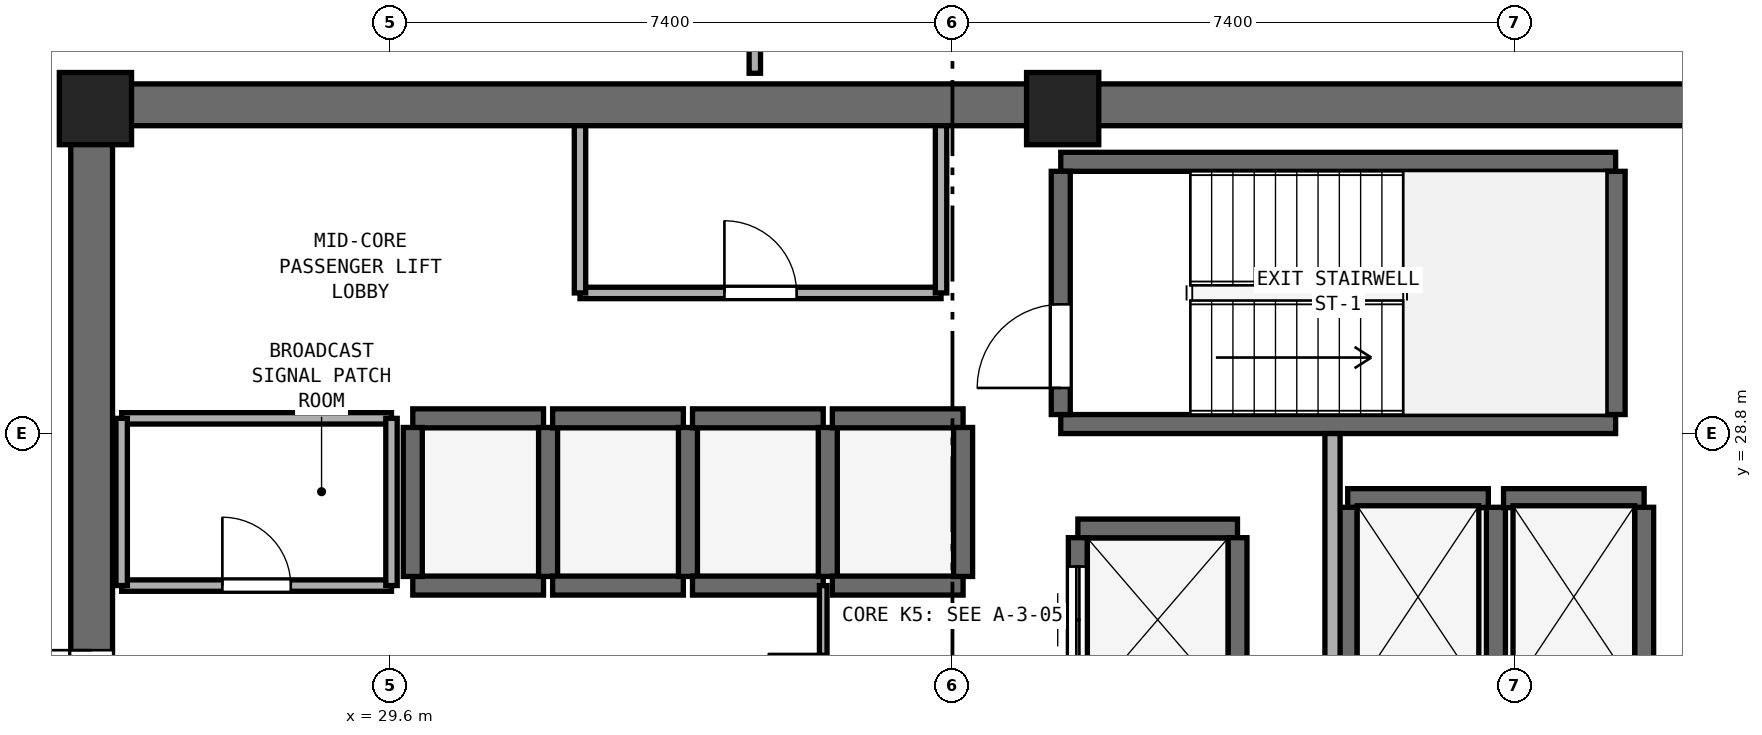
"""IFC4 building model, lengths in metres.
Left out: names, types, materials, properties, quantities, classifications, styles, units other than length and angle.
Written with IfcOpenShell. Run it as: python <this file> out.ifc"""

import sys

from ifc_helpers import new_model, si_unit, direction, frame, frame_2d, origin, origin_2d, place, context, subcontext, project, spatial, rectangle, extrude, element, fill, save


model = new_model("IFC4")
c1 = context("Model", 3, precision=1e-05, world=origin(), true_north=direction((0.0, 1.0)))
c2 = subcontext(c1, "Body", "Model", "MODEL_VIEW")
j1 = project(units=[si_unit("LENGTHUNIT", "METRE"), si_unit("PLANEANGLEUNIT", "RADIAN")], contexts=[c1])
p1 = place(None, origin())
s1 = spatial("IfcSite", under=j1, at=p1, CompositionType="ELEMENT")
p2 = place(p1, origin())
s2 = spatial("IfcBuilding", under=s1, at=p2, CompositionType="ELEMENT")
p3 = place(p2, frame((0.0, 0.0, 216.2)))
s3 = spatial("IfcBuildingStorey", under=s2, at=p3, CompositionType="ELEMENT", Elevation=216.2)
p4 = place(p3, frame((25.4, 33.125, 0.0), z_axis=(0.0, 0.0, 1.0), x_axis=(1.0, 0.0, 0.0)))
e1 = element("IfcWall", 1, at=p4, inside=s3, PredefinedType="SHEAR", context=c2, shape_type="SweptSolid", body=[
    extrude(rectangle(XDim=23.2, YDim=0.55, at=frame_2d((11.6, 0.0))), origin(), (0.0, 0.0, 1.0), 3.4),
])
p5 = place(p3, frame((25.675, 17.55, 0.0), z_axis=(0.0, 0.0, 1.0), x_axis=(0.0, 1.0, 0.0)))
e2 = element("IfcWall", 2, at=p5, inside=s3, PredefinedType="SHEAR", context=c2, shape_type="SweptSolid", body=[
    extrude(rectangle(XDim=15.3, YDim=0.55, at=frame_2d((7.65, 0.0))), origin(), (0.0, 0.0, 1.0), 3.4),
])
p6 = place(p5, frame((6.9, 0.0, 0.0)))
e3 = element("IfcOpeningElement", 3, at=p6, cuts=e2, PredefinedType="OPENING", context=c2, shape_type="SweptSolid", body=[
    extrude(rectangle(XDim=1.5, YDim=2.15, at=frame_2d((0.75, 1.075))), frame((0.0, 0.285, 0.0), z_axis=(0.0, -1.0, 0.0), x_axis=(1.0, 0.0, 0.0)), (0.0, 0.0, 1.0), 0.57),
])
for number, where, z_axis, x_axis in (
    (4, (38.45, 33.075, 0.0), (0.0, 0.0, 1.0), (1.0, 0.0, 0.0)),
    (5, (25.725, 33.075, 0.0), (0.0, 0.0, 1.0), (1.0, 0.0, 0.0)),
):
    element("IfcColumn", number, at=place(p3, frame(where, z_axis=z_axis, x_axis=x_axis)), inside=s3, PredefinedType="PILASTER", context=c2, shape_type="SweptSolid", body=[
        extrude(rectangle(XDim=0.95, YDim=0.95, at=origin_2d()), origin(), (0.0, 0.0, 1.0), 3.8),
    ])
for number, where, z_axis, x_axis in (
    (6, (38.425, 28.925, 0.0), (0.0, 0.0, 1.0), (1.0, 0.0, 0.0)),
    (7, (38.425, 32.375, 0.0), (0.0, 0.0, 1.0), (1.0, 0.0, 0.0)),
):
    element("IfcWall", number, at=place(p3, frame(where, z_axis=z_axis, x_axis=x_axis)), inside=s3, PredefinedType="SHEAR", context=c2, shape_type="SweptSolid", body=[
        extrude(rectangle(XDim=7.3, YDim=0.25, at=frame_2d((3.65, 0.0))), origin(), (0.0, 0.0, 1.0), 3.4),
    ])
p7 = place(p3, frame((38.425, 29.05, 0.0), z_axis=(0.0, 0.0, 1.0), x_axis=(0.0, 1.0, 0.0)))
e8 = element("IfcWall", 8, at=p7, inside=s3, PredefinedType="SHEAR", context=c2, shape_type="SweptSolid", body=[
    extrude(rectangle(XDim=3.2, YDim=0.25, at=frame_2d((1.6, 0.0))), origin(), (0.0, 0.0, 1.0), 3.4),
])
p8 = place(p7, frame((0.35, 0.0, 0.0)))
e9 = element("IfcOpeningElement", 9, at=p8, cuts=e8, PredefinedType="OPENING", context=c2, shape_type="SweptSolid", body=[
    extrude(rectangle(XDim=1.1, YDim=2.15, at=frame_2d((0.55, 1.075))), frame((0.0, 0.135, 0.0), z_axis=(0.0, -1.0, 0.0), x_axis=(1.0, 0.0, 0.0)), (0.0, 0.0, 1.0), 0.27),
])
p9 = place(p3, frame((45.725, 29.05, 0.0), z_axis=(0.0, 0.0, 1.0), x_axis=(0.0, 1.0, 0.0)))
e10 = element("IfcWall", 10, at=p9, inside=s3, PredefinedType="SHEAR", context=c2, shape_type="SweptSolid", body=[
    extrude(rectangle(XDim=3.2, YDim=0.25, at=frame_2d((1.6, 0.0))), origin(), (0.0, 0.0, 1.0), 3.4),
])
for number, where, z_axis, x_axis in (
    (11, (29.9, 26.8, 0.0), (0.0, 0.0, 1.0), (1.0, 0.0, 0.0)),
    (12, (29.9, 29.0, 0.0), (0.0, 0.0, 1.0), (1.0, 0.0, 0.0)),
):
    element("IfcWall", number, at=place(p3, frame(where, z_axis=z_axis, x_axis=x_axis)), inside=s3, PredefinedType="SHEAR", context=c2, shape_type="SweptSolid", body=[
        extrude(rectangle(XDim=1.72, YDim=0.25, at=frame_2d((0.86, 0.0))), origin(), (0.0, 0.0, 1.0), 3.4),
    ])
for number, where, z_axis, x_axis in (
    (13, (29.9, 26.92, 0.0), (0.0, 0.0, 1.0), (0.0, 1.0, 0.0)),
    (14, (31.68, 26.92, 0.0), (0.0, 0.0, 1.0), (0.0, 1.0, 0.0)),
):
    element("IfcWall", number, at=place(p3, frame(where, z_axis=z_axis, x_axis=x_axis)), inside=s3, PredefinedType="SHEAR", context=c2, shape_type="SweptSolid", body=[
        extrude(rectangle(XDim=1.96, YDim=0.25, at=frame_2d((0.98, 0.0))), origin(), (0.0, 0.0, 1.0), 3.4),
    ])
for number, where, z_axis, x_axis in (
    (15, (31.74, 26.8, 0.0), (0.0, 0.0, 1.0), (1.0, 0.0, 0.0)),
    (16, (31.74, 29.0, 0.0), (0.0, 0.0, 1.0), (1.0, 0.0, 0.0)),
):
    element("IfcWall", number, at=place(p3, frame(where, z_axis=z_axis, x_axis=x_axis)), inside=s3, PredefinedType="SHEAR", context=c2, shape_type="SweptSolid", body=[
        extrude(rectangle(XDim=1.72, YDim=0.25, at=frame_2d((0.86, 0.0))), origin(), (0.0, 0.0, 1.0), 3.4),
    ])
p10 = place(p3, frame((33.52, 26.92, 0.0), z_axis=(0.0, 0.0, 1.0), x_axis=(0.0, 1.0, 0.0)))
e17 = element("IfcWall", 17, at=p10, inside=s3, PredefinedType="SHEAR", context=c2, shape_type="SweptSolid", body=[
    extrude(rectangle(XDim=1.96, YDim=0.25, at=frame_2d((0.98, 0.0))), origin(), (0.0, 0.0, 1.0), 3.4),
])
for number, where, z_axis, x_axis in (
    (18, (33.58, 26.8, 0.0), (0.0, 0.0, 1.0), (1.0, 0.0, 0.0)),
    (19, (33.58, 29.0, 0.0), (0.0, 0.0, 1.0), (1.0, 0.0, 0.0)),
):
    element("IfcWall", number, at=place(p3, frame(where, z_axis=z_axis, x_axis=x_axis)), inside=s3, PredefinedType="SHEAR", context=c2, shape_type="SweptSolid", body=[
        extrude(rectangle(XDim=1.72, YDim=0.25, at=frame_2d((0.86, 0.0))), origin(), (0.0, 0.0, 1.0), 3.4),
    ])
p11 = place(p3, frame((35.36, 26.92, 0.0), z_axis=(0.0, 0.0, 1.0), x_axis=(0.0, 1.0, 0.0)))
e20 = element("IfcWall", 20, at=p11, inside=s3, PredefinedType="SHEAR", context=c2, shape_type="SweptSolid", body=[
    extrude(rectangle(XDim=1.96, YDim=0.25, at=frame_2d((0.98, 0.0))), origin(), (0.0, 0.0, 1.0), 3.4),
])
for number, where, z_axis, x_axis in (
    (21, (35.42, 26.8, 0.0), (0.0, 0.0, 1.0), (1.0, 0.0, 0.0)),
    (22, (35.42, 29.0, 0.0), (0.0, 0.0, 1.0), (1.0, 0.0, 0.0)),
):
    element("IfcWall", number, at=place(p3, frame(where, z_axis=z_axis, x_axis=x_axis)), inside=s3, PredefinedType="SHEAR", context=c2, shape_type="SweptSolid", body=[
        extrude(rectangle(XDim=1.72, YDim=0.25, at=frame_2d((0.86, 0.0))), origin(), (0.0, 0.0, 1.0), 3.4),
    ])
p12 = place(p3, frame((37.14, 26.92, 0.0), z_axis=(0.0, 0.0, 1.0), x_axis=(0.0, 1.0, 0.0)))
e23 = element("IfcWall", 23, at=p12, inside=s3, PredefinedType="SHEAR", context=c2, shape_type="SweptSolid", body=[
    extrude(rectangle(XDim=1.96, YDim=0.25, at=frame_2d((0.98, 0.0))), origin(), (0.0, 0.0, 1.0), 3.4),
])
p13 = place(p3, frame((42.2, 27.95, 0.0), z_axis=(0.0, 0.0, 1.0), x_axis=(1.0, 0.0, 0.0)))
e24 = element("IfcWall", 24, at=p13, inside=s3, PredefinedType="SHEAR", context=c2, shape_type="SweptSolid", body=[
    extrude(rectangle(XDim=1.85, YDim=0.25, at=frame_2d((0.925, 0.0))), origin(), (0.0, 0.0, 1.0), 3.4),
])
for number, where, z_axis, x_axis in (
    (25, (42.2, 25.47, 0.0), (0.0, 0.0, 1.0), (0.0, 1.0, 0.0)),
    (26, (44.15, 25.47, 0.0), (0.0, 0.0, 1.0), (0.0, 1.0, 0.0)),
):
    element("IfcWall", number, at=place(p3, frame(where, z_axis=z_axis, x_axis=x_axis)), inside=s3, PredefinedType="SHEAR", context=c2, shape_type="SweptSolid", body=[
        extrude(rectangle(XDim=2.36, YDim=0.25, at=frame_2d((1.18, 0.0))), origin(), (0.0, 0.0, 1.0), 3.4),
    ])
p14 = place(p3, frame((44.25, 27.95, 0.0), z_axis=(0.0, 0.0, 1.0), x_axis=(1.0, 0.0, 0.0)))
e27 = element("IfcWall", 27, at=p14, inside=s3, PredefinedType="SHEAR", context=c2, shape_type="SweptSolid", body=[
    extrude(rectangle(XDim=1.85, YDim=0.25, at=frame_2d((0.925, 0.0))), origin(), (0.0, 0.0, 1.0), 3.4),
])
p15 = place(p3, frame((46.1, 25.47, 0.0), z_axis=(0.0, 0.0, 1.0), x_axis=(0.0, 1.0, 0.0)))
e28 = element("IfcWall", 28, at=p15, inside=s3, PredefinedType="SHEAR", context=c2, shape_type="SweptSolid", body=[
    extrude(rectangle(XDim=2.36, YDim=0.25, at=frame_2d((1.18, 0.0))), origin(), (0.0, 0.0, 1.0), 3.4),
])
p16 = place(p3, frame((38.65, 27.55, 0.0), z_axis=(0.0, 0.0, 1.0), x_axis=(1.0, 0.0, 0.0)))
e29 = element("IfcWall", 29, at=p16, inside=s3, PredefinedType="SHEAR", context=c2, shape_type="SweptSolid", body=[
    extrude(rectangle(XDim=2.1, YDim=0.25, at=frame_2d((1.05, 0.0))), origin(), (0.0, 0.0, 1.0), 3.4),
])
p17 = place(p3, frame((38.65, 25.27, 0.0), z_axis=(0.0, 0.0, 1.0), x_axis=(0.0, 1.0, 0.0)))
e30 = element("IfcWall", 30, at=p17, inside=s3, PredefinedType="SHEAR", context=c2, shape_type="SweptSolid", body=[
    extrude(rectangle(XDim=2.16, YDim=0.25, at=frame_2d((1.08, 0.0))), origin(), (0.0, 0.0, 1.0), 3.4),
])
p18 = place(p17, frame((0.38, 0.0, 0.0)))
e31 = element("IfcOpeningElement", 31, at=p18, cuts=e30, PredefinedType="OPENING", context=c2, shape_type="SweptSolid", body=[
    extrude(rectangle(XDim=1.4, YDim=2.2, at=frame_2d((0.7, 1.1))), frame((0.0, 0.135, 0.0), z_axis=(0.0, -1.0, 0.0), x_axis=(1.0, 0.0, 0.0)), (0.0, 0.0, 1.0), 0.27),
])
p19 = place(p3, frame((40.75, 25.27, 0.0), z_axis=(0.0, 0.0, 1.0), x_axis=(0.0, 1.0, 0.0)))
e32 = element("IfcWall", 32, at=p19, inside=s3, PredefinedType="SHEAR", context=c2, shape_type="SweptSolid", body=[
    extrude(rectangle(XDim=2.16, YDim=0.25, at=frame_2d((1.08, 0.0))), origin(), (0.0, 0.0, 1.0), 3.4),
])
p20 = place(p3, frame((42.0, 22.75, 0.0), z_axis=(0.0, 0.0, 1.0), x_axis=(0.0, 1.0, 0.0)))
e33 = element("IfcWall", 33, at=p20, inside=s3, PredefinedType="SOLIDWALL", context=c2, shape_type="SweptSolid", body=[
    extrude(rectangle(XDim=6.05, YDim=0.2, at=frame_2d((3.025, 0.0))), origin(), (0.0, 0.0, 1.0), 3.4),
])
p21 = place(p20, frame((0.65, 0.0, 0.0)))
e34 = element("IfcOpeningElement", 34, at=p21, cuts=e33, PredefinedType="OPENING", context=c2, shape_type="SweptSolid", body=[
    extrude(rectangle(XDim=1.2, YDim=2.15, at=frame_2d((0.6, 1.075))), frame((0.0, 0.11, 0.0), z_axis=(0.0, -1.0, 0.0), x_axis=(1.0, 0.0, 0.0)), (0.0, 0.0, 1.0), 0.22),
])
p22 = place(p3, frame((32.1, 30.65, 0.0), z_axis=(0.0, 0.0, 1.0), x_axis=(1.0, 0.0, 0.0)))
e35 = element("IfcWall", 35, at=p22, inside=s3, PredefinedType="PARTITIONING", context=c2, shape_type="SweptSolid", body=[
    extrude(rectangle(XDim=4.75, YDim=0.15, at=frame_2d((2.375, 0.0))), origin(), (0.0, 0.0, 1.0), 3.4),
])
p23 = place(p22, frame((1.9, 0.0, 0.0)))
e36 = element("IfcOpeningElement", 36, at=p23, cuts=e35, PredefinedType="OPENING", context=c2, shape_type="SweptSolid", body=[
    extrude(rectangle(XDim=0.95, YDim=2.1, at=frame_2d((0.475, 1.05))), frame((0.0, 0.085, 0.0), z_axis=(0.0, -1.0, 0.0), x_axis=(1.0, 0.0, 0.0)), (0.0, 0.0, 1.0), 0.17),
])
for number, where, z_axis, x_axis in (
    (37, (32.1, 30.65, 0.0), (0.0, 0.0, 1.0), (0.0, 1.0, 0.0)),
    (38, (36.85, 30.65, 0.0), (0.0, 0.0, 1.0), (0.0, 1.0, 0.0)),
):
    element("IfcWall", number, at=place(p3, frame(where, z_axis=z_axis, x_axis=x_axis)), inside=s3, PredefinedType="PARTITIONING", context=c2, shape_type="SweptSolid", body=[
        extrude(rectangle(XDim=2.2, YDim=0.15, at=frame_2d((1.1, 0.0))), origin(), (0.0, 0.0, 1.0), 3.4),
    ])
p24 = place(p3, frame((26.07, 26.8, 0.0), z_axis=(0.0, 0.0, 1.0), x_axis=(1.0, 0.0, 0.0)))
e39 = element("IfcWall", 39, at=p24, inside=s3, PredefinedType="PARTITIONING", context=c2, shape_type="SweptSolid", body=[
    extrude(rectangle(XDim=3.55, YDim=0.15, at=frame_2d((1.775, 0.0))), origin(), (0.0, 0.0, 1.0), 3.4),
])
p25 = place(p24, frame((1.325, 0.0, 0.0)))
e40 = element("IfcOpeningElement", 40, at=p25, cuts=e39, PredefinedType="OPENING", context=c2, shape_type="SweptSolid", body=[
    extrude(rectangle(XDim=0.9, YDim=2.1, at=frame_2d((0.45, 1.05))), frame((0.0, 0.085, 0.0), z_axis=(0.0, -1.0, 0.0), x_axis=(1.0, 0.0, 0.0)), (0.0, 0.0, 1.0), 0.17),
])
p26 = place(p3, frame((26.07, 29.0, 0.0), z_axis=(0.0, 0.0, 1.0), x_axis=(1.0, 0.0, 0.0)))
e41 = element("IfcWall", 41, at=p26, inside=s3, PredefinedType="PARTITIONING", context=c2, shape_type="SweptSolid", body=[
    extrude(rectangle(XDim=3.55, YDim=0.15, at=frame_2d((1.775, 0.0))), origin(), (0.0, 0.0, 1.0), 3.4),
])
p27 = place(p3, frame((26.07, 26.8, 0.0), z_axis=(0.0, 0.0, 1.0), x_axis=(0.0, 1.0, 0.0)))
e42 = element("IfcWall", 42, at=p27, inside=s3, PredefinedType="PARTITIONING", context=c2, shape_type="SweptSolid", body=[
    extrude(rectangle(XDim=2.2, YDim=0.15, at=frame_2d((1.1, 0.0))), origin(), (0.0, 0.0, 1.0), 2.5),
])
p28 = place(p3, frame((29.62, 26.8, 0.0), z_axis=(0.0, 0.0, 1.0), x_axis=(0.0, 1.0, 0.0)))
e43 = element("IfcWall", 43, at=p28, inside=s3, PredefinedType="PARTITIONING", context=c2, shape_type="SweptSolid", body=[
    extrude(rectangle(XDim=2.2, YDim=0.15, at=frame_2d((1.1, 0.0))), origin(), (0.0, 0.0, 1.0), 3.4),
])
p29 = place(p3, frame((35.3, 23.6, 0.0), z_axis=(0.0, 0.0, 1.0), x_axis=(0.0, 1.0, 0.0)))
e44 = element("IfcWall", 44, at=p29, inside=s3, PredefinedType="PARTITIONING", context=c2, shape_type="SweptSolid", body=[
    extrude(rectangle(XDim=3.2, YDim=0.1, at=frame_2d((1.6, 0.0))), origin(), (0.0, 0.0, 1.0), 3.4),
])
p30 = place(p29, frame((0.85, 0.0, 0.0)))
e45 = element("IfcOpeningElement", 45, at=p30, cuts=e44, PredefinedType="OPENING", context=c2, shape_type="SweptSolid", body=[
    extrude(rectangle(XDim=1.45, YDim=2.12, at=frame_2d((0.725, 1.06))), frame((0.0, 0.06, 0.0), z_axis=(0.0, -1.0, 0.0), x_axis=(1.0, 0.0, 0.0)), (0.0, 0.0, 1.0), 0.12),
])
p31 = place(p3, frame((34.4, 33.54, 0.0), z_axis=(0.0, 0.0, 1.0), x_axis=(0.0, 1.0, 0.0)))
e46 = element("IfcWall", 46, at=p31, inside=s3, PredefinedType="PARTITIONING", context=c2, shape_type="SweptSolid", body=[
    extrude(rectangle(XDim=1.81, YDim=0.15, at=frame_2d((0.905, 0.0))), origin(), (0.0, 0.0, 1.0), 3.4),
])
p32 = place(p8, origin())
e47 = element("IfcDoor", 47, at=p32, inside=s3, OperationType="SINGLE_SWING_LEFT", PredefinedType="DOOR", context=c2, shape_type="SweptSolid", body=[
    extrude(rectangle(XDim=1.1, YDim=2.15, at=frame_2d((0.55, 1.075))), frame((0.0, 0.025, 0.0), z_axis=(0.0, -1.0, 0.0), x_axis=(1.0, 0.0, 0.0)), (0.0, 0.0, 1.0), 0.05),
])
fill(e9, e47)
p33 = place(p18, origin())
e48 = element("IfcDoor", 48, at=p33, inside=s3, OperationType="DOUBLE_DOOR_SLIDING", PredefinedType="DOOR", context=c2, shape_type="SweptSolid", body=[
    extrude(rectangle(XDim=1.4, YDim=2.2, at=frame_2d((0.7, 1.1))), frame((0.0, 0.025, 0.0), z_axis=(0.0, -1.0, 0.0), x_axis=(1.0, 0.0, 0.0)), (0.0, 0.0, 1.0), 0.05),
])
fill(e31, e48)
p34 = place(p6, origin())
e49 = element("IfcDoor", 49, at=p34, inside=s3, OperationType="DOUBLE_DOOR_SINGLE_SWING", PredefinedType="DOOR", context=c2, shape_type="SweptSolid", body=[
    extrude(rectangle(XDim=1.5, YDim=2.15, at=frame_2d((0.75, 1.075))), frame((0.0, 0.025, 0.0), z_axis=(0.0, -1.0, 0.0), x_axis=(1.0, 0.0, 0.0)), (0.0, 0.0, 1.0), 0.05),
])
fill(e3, e49)
p35 = place(p23, origin())
e50 = element("IfcDoor", 50, at=p35, inside=s3, OperationType="SINGLE_SWING_LEFT", PredefinedType="DOOR", context=c2, shape_type="SweptSolid", body=[
    extrude(rectangle(XDim=0.95, YDim=2.1, at=frame_2d((0.475, 1.05))), frame((0.0, 0.025, 0.0), z_axis=(0.0, -1.0, 0.0), x_axis=(1.0, 0.0, 0.0)), (0.0, 0.0, 1.0), 0.05),
])
fill(e36, e50)
p36 = place(p25, origin())
e51 = element("IfcDoor", 51, at=p36, inside=s3, OperationType="SINGLE_SWING_LEFT", PredefinedType="DOOR", context=c2, shape_type="SweptSolid", body=[
    extrude(rectangle(XDim=0.9, YDim=2.1, at=frame_2d((0.45, 1.05))), frame((0.0, 0.025, 0.0), z_axis=(0.0, -1.0, 0.0), x_axis=(1.0, 0.0, 0.0)), (0.0, 0.0, 1.0), 0.05),
])
fill(e40, e51)
p37 = place(p30, origin())
e52 = element("IfcDoor", 52, at=p37, inside=s3, OperationType="DOUBLE_DOOR_SINGLE_SWING", PredefinedType="DOOR", context=c2, shape_type="SweptSolid", body=[
    extrude(rectangle(XDim=1.45, YDim=2.12, at=frame_2d((0.725, 1.06))), frame((0.0, 0.025, 0.0), z_axis=(0.0, -1.0, 0.0), x_axis=(1.0, 0.0, 0.0)), (0.0, 0.0, 1.0), 0.05),
])
fill(e45, e52)
save(model, sys.argv[1])
